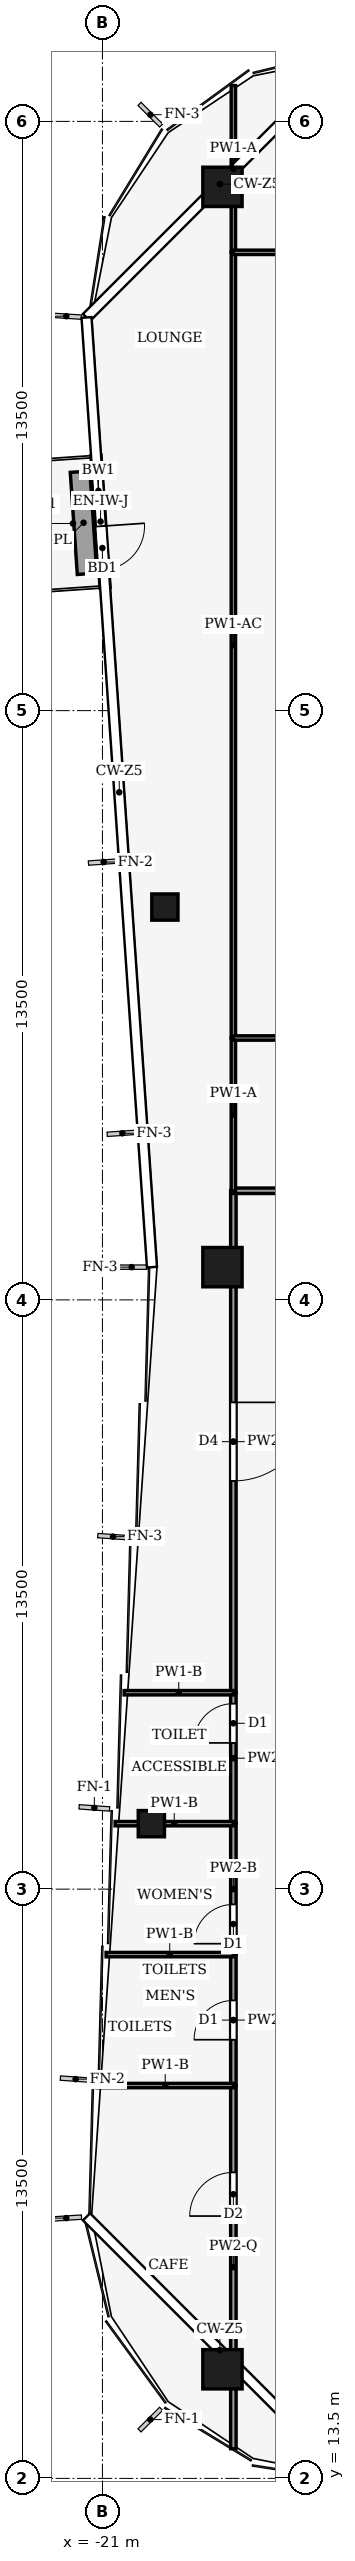
"""IFC4 building model, lengths in metres.
Left out: names, types, materials, properties, quantities, classifications, styles, units other than length and angle.
Written with IfcOpenShell. Run it as: python <this file> out.ifc"""

import sys

from ifc_helpers import new_model, si_unit, direction, frame, frame_2d, origin, origin_2d, place, context, subcontext, project, spatial, rectangle, hollow_rectangle, extrude, element, fill, save


model = new_model("IFC4")
c1 = context("Model", 3, precision=1e-05, world=origin(), true_north=direction((0.0, 1.0)))
c2 = subcontext(c1, "Body", "Model", "MODEL_VIEW")
j1 = project(units=[si_unit("LENGTHUNIT", "METRE"), si_unit("PLANEANGLEUNIT", "RADIAN")], contexts=[c1])
p1 = place(None, origin())
s1 = spatial("IfcSite", under=j1, at=p1, CompositionType="ELEMENT")
p2 = place(p1, origin())
s2 = spatial("IfcBuilding", under=s1, at=p2, CompositionType="ELEMENT")
p3 = place(p2, frame((0.0, 0.0, 289.0)))
s3 = spatial("IfcBuildingStorey", under=s2, at=p3, CompositionType="ELEMENT", Elevation=289.0)
for number, where, z_axis, x_axis in (
    (1, (-18.25, 66.0, 0.0), (0.0, 0.0, 1.0), (1.0, 0.0, 0.0)),
    (2, (-18.25, 16.0, 0.0), (0.0, 0.0, 1.0), (1.0, 0.0, 0.0)),
    (3, (-18.25, 41.25, 0.0), (0.0, 0.0, 1.0), (1.0, 0.0, 0.0)),
):
    element("IfcColumn", number, at=place(p3, frame(where, z_axis=z_axis, x_axis=x_axis)), inside=s3, PredefinedType="COLUMN", context=c2, shape_type="SweptSolid", body=[
        extrude(hollow_rectangle(XDim=0.9, YDim=0.9, WallThickness=0.04, at=origin_2d()), origin(), (0.0, 0.0, 1.0), 5.0),
    ])
for number, where, z_axis, x_axis in (
    (4, (-19.879, 28.5, 0.0), (0.0, 0.0, 1.0), (1.0, 0.0, 0.0)),
    (5, (-19.569, 49.5, 0.0), (0.0, 0.0, 1.0), (1.0, 0.0, 0.0)),
):
    element("IfcColumn", number, at=place(p3, frame(where, z_axis=z_axis, x_axis=x_axis)), inside=s3, PredefinedType="COLUMN", context=c2, shape_type="SweptSolid", body=[
        extrude(hollow_rectangle(XDim=0.6, YDim=0.6, WallThickness=0.025, at=origin_2d()), origin(), (0.0, 0.0, 1.0), 5.0),
    ])
p4 = place(p3, frame((-21.148, 59.85, 0.0), z_axis=(0.0, 0.0, 1.0), x_axis=(0.068802091615, -0.997630328423, 0.0)))
e6 = element("IfcWall", 6, at=p4, inside=s3, PredefinedType="SOLIDWALL", context=c2, shape_type="SweptSolid", body=[
    extrude(rectangle(XDim=3.045, YDim=0.23, at=frame_2d((1.522, 0.0))), origin(), (0.0, 0.0, 1.0), 4.65),
])
p5 = place(p4, frame((1.63, 0.0, 0.0)))
e7 = element("IfcOpeningElement", 7, at=p5, cuts=e6, PredefinedType="OPENING", context=c2, shape_type="SweptSolid", body=[
    extrude(rectangle(XDim=1.0, YDim=2.1, at=frame_2d((0.5, 1.05))), frame((0.0, 0.125, 0.0), z_axis=(0.0, -1.0, 0.0), x_axis=(1.0, 0.0, 0.0)), (0.0, 0.0, 1.0), 0.25),
])
p6 = place(p4, frame((0.415, 0.0, 0.9)))
e8 = element("IfcOpeningElement", 8, at=p6, cuts=e6, PredefinedType="OPENING", context=c2, shape_type="SweptSolid", body=[
    extrude(rectangle(XDim=0.8, YDim=1.2, at=frame_2d((0.4, 0.6))), frame((0.0, 0.125, 0.0), z_axis=(0.0, -1.0, 0.0), x_axis=(1.0, 0.0, 0.0)), (0.0, 0.0, 1.0), 0.25),
])
p7 = place(p3, frame((-21.513, 59.474, 0.0), z_axis=(0.0, 0.0, 1.0), x_axis=(0.068723472833, -0.997635747295, 0.0)))
e9 = element("IfcWall", 9, at=p7, inside=s3, PredefinedType="USERDEFINED", context=c2, shape_type="SweptSolid", body=[
    extrude(rectangle(XDim=2.345, YDim=0.45, at=frame_2d((1.172, 0.0))), origin(), (0.0, 0.0, 1.0), 0.4),
])
p8 = place(p3, frame((-18.0, 14.18, 0.0), z_axis=(0.0, 0.0, 1.0), x_axis=(0.0, 1.0, 0.0)))
e10 = element("IfcWall", 10, at=p8, inside=s3, PredefinedType="PARTITIONING", context=c2, shape_type="SweptSolid", body=[
    extrude(rectangle(XDim=8.32, YDim=0.125, at=frame_2d((4.16, 0.0))), origin(), (0.0, 0.0, 1.0), 3.93),
])
p9 = place(p8, frame((5.33, 0.0, 0.0)))
e11 = element("IfcOpeningElement", 11, at=p9, cuts=e10, PredefinedType="OPENING", context=c2, shape_type="SweptSolid", body=[
    extrude(rectangle(XDim=1.0, YDim=2.1, at=frame_2d((0.5, 1.05))), frame((0.0, 0.073, 0.0), z_axis=(0.0, -1.0, 0.0), x_axis=(1.0, 0.0, 0.0)), (0.0, 0.0, 1.0), 0.145),
])
p10 = place(p3, frame((-18.0, 22.5, 0.0), z_axis=(0.0, 0.0, 1.0), x_axis=(0.0, 1.0, 0.0)))
e12 = element("IfcWall", 12, at=p10, inside=s3, PredefinedType="PARTITIONING", context=c2, shape_type="SweptSolid", body=[
    extrude(rectangle(XDim=3.0, YDim=0.125, at=frame_2d((1.5, 0.0))), origin(), (0.0, 0.0, 1.0), 4.54),
])
p11 = place(p10, frame((1.05, 0.0, 0.0)))
e13 = element("IfcOpeningElement", 13, at=p11, cuts=e12, PredefinedType="OPENING", context=c2, shape_type="SweptSolid", body=[
    extrude(rectangle(XDim=0.9, YDim=2.1, at=frame_2d((0.45, 1.05))), frame((0.0, 0.073, 0.0), z_axis=(0.0, -1.0, 0.0), x_axis=(1.0, 0.0, 0.0)), (0.0, 0.0, 1.0), 0.145),
])
p12 = place(p3, frame((-18.0, 25.5, 0.0), z_axis=(0.0, 0.0, 1.0), x_axis=(0.0, 1.0, 0.0)))
e14 = element("IfcWall", 14, at=p12, inside=s3, PredefinedType="PARTITIONING", context=c2, shape_type="SweptSolid", body=[
    extrude(rectangle(XDim=3.0, YDim=0.125, at=frame_2d((1.5, 0.0))), origin(), (0.0, 0.0, 1.0), 4.87),
])
p13 = place(p12, frame((0.25, 0.0, 0.0)))
e15 = element("IfcOpeningElement", 15, at=p13, cuts=e14, PredefinedType="OPENING", context=c2, shape_type="SweptSolid", body=[
    extrude(rectangle(XDim=0.9, YDim=2.1, at=frame_2d((0.45, 1.05))), frame((0.0, 0.073, 0.0), z_axis=(0.0, -1.0, 0.0), x_axis=(1.0, 0.0, 0.0)), (0.0, 0.0, 1.0), 0.145),
])
p14 = place(p3, frame((-18.0, 28.5, 0.0), z_axis=(0.0, 0.0, 1.0), x_axis=(0.0, 1.0, 0.0)))
e16 = element("IfcWall", 16, at=p14, inside=s3, PredefinedType="PARTITIONING", context=c2, shape_type="SweptSolid", body=[
    extrude(rectangle(XDim=3.0, YDim=0.125, at=frame_2d((1.5, 0.0))), origin(), (0.0, 0.0, 1.0), 4.87),
])
p15 = place(p14, frame((1.85, 0.0, 0.0)))
e17 = element("IfcOpeningElement", 17, at=p15, cuts=e16, PredefinedType="OPENING", context=c2, shape_type="SweptSolid", body=[
    extrude(rectangle(XDim=0.9, YDim=2.1, at=frame_2d((0.45, 1.05))), frame((0.0, 0.073, 0.0), z_axis=(0.0, -1.0, 0.0), x_axis=(1.0, 0.0, 0.0)), (0.0, 0.0, 1.0), 0.145),
])
p16 = place(p3, frame((-18.0, 43.004, 0.0), z_axis=(0.0, 0.0, 1.0), x_axis=(0.0, -1.0, 0.0)))
e18 = element("IfcWall", 18, at=p16, inside=s3, PredefinedType="PARTITIONING", context=c2, shape_type="SweptSolid", body=[
    extrude(rectangle(XDim=11.504, YDim=0.125, at=frame_2d((5.752, 0.0))), origin(), (0.0, 0.0, 1.0), 4.14),
])
p17 = place(p16, frame((4.852, 0.0, 0.0)))
e19 = element("IfcOpeningElement", 19, at=p17, cuts=e18, PredefinedType="OPENING", context=c2, shape_type="SweptSolid", body=[
    extrude(rectangle(XDim=1.8, YDim=2.1, at=frame_2d((0.9, 1.05))), frame((0.0, 0.073, 0.0), z_axis=(0.0, -1.0, 0.0), x_axis=(1.0, 0.0, 0.0)), (0.0, 0.0, 1.0), 0.145),
])
p18 = place(p3, frame((-18.0, 43.0, 0.0), z_axis=(0.0, 0.0, 1.0), x_axis=(1.0, 0.0, 0.0)))
e20 = element("IfcWall", 20, at=p18, inside=s3, PredefinedType="PARTITIONING", context=c2, shape_type="SweptSolid", body=[
    extrude(rectangle(XDim=12.0, YDim=0.125, at=frame_2d((6.0, 0.0))), origin(), (0.0, 0.0, 1.0), 4.39),
])
p19 = place(p18, frame((5.5, 0.0, 0.0)))
e21 = element("IfcOpeningElement", 21, at=p19, cuts=e20, PredefinedType="OPENING", context=c2, shape_type="SweptSolid", body=[
    extrude(rectangle(XDim=1.0, YDim=2.1, at=frame_2d((0.5, 1.05))), frame((0.0, 0.073, 0.0), z_axis=(0.0, -1.0, 0.0), x_axis=(1.0, 0.0, 0.0)), (0.0, 0.0, 1.0), 0.145),
])
p20 = place(p3, frame((-18.0, 22.5, 0.0), z_axis=(0.0, 0.0, 1.0), x_axis=(-1.0, 0.0, 0.0)))
e22 = element("IfcWall", 22, at=p20, inside=s3, PredefinedType="PARTITIONING", context=c2, shape_type="SweptSolid", body=[
    extrude(rectangle(XDim=3.123, YDim=0.1, at=frame_2d((1.562, 0.0))), origin(), (0.0, 0.0, 1.0), 4.04),
])
p21 = place(p3, frame((-18.0, 25.5, 0.0), z_axis=(0.0, 0.0, 1.0), x_axis=(-1.0, 0.0, 0.0)))
e23 = element("IfcWall", 23, at=p21, inside=s3, PredefinedType="PARTITIONING", context=c2, shape_type="SweptSolid", body=[
    extrude(rectangle(XDim=2.916, YDim=0.1, at=frame_2d((1.458, 0.0))), origin(), (0.0, 0.0, 1.0), 4.04),
])
p22 = place(p3, frame((-18.0, 28.5, 0.0), z_axis=(0.0, 0.0, 1.0), x_axis=(-1.0, 0.0, 0.0)))
e24 = element("IfcWall", 24, at=p22, inside=s3, PredefinedType="PARTITIONING", context=c2, shape_type="SweptSolid", body=[
    extrude(rectangle(XDim=2.709, YDim=0.1, at=frame_2d((1.354, 0.0))), origin(), (0.0, 0.0, 1.0), 4.04),
])
p23 = place(p3, frame((-18.0, 31.5, 0.0), z_axis=(0.0, 0.0, 1.0), x_axis=(-1.0, 0.0, 0.0)))
e25 = element("IfcWall", 25, at=p23, inside=s3, PredefinedType="PARTITIONING", context=c2, shape_type="SweptSolid", body=[
    extrude(rectangle(XDim=2.502, YDim=0.1, at=frame_2d((1.251, 0.0))), origin(), (0.0, 0.0, 1.0), 4.04),
])
p24 = place(p3, frame((-18.0, 43.0, 0.0), z_axis=(0.0, 0.0, 1.0), x_axis=(0.0, 1.0, 0.0)))
e26 = element("IfcWall", 26, at=p24, inside=s3, PredefinedType="PARTITIONING", context=c2, shape_type="SweptSolid", body=[
    extrude(rectangle(XDim=3.5, YDim=0.1, at=frame_2d((1.75, 0.0))), origin(), (0.0, 0.0, 1.0), 4.87),
])
p25 = place(p3, frame((-18.0, 46.5, 0.0), z_axis=(0.0, 0.0, 1.0), x_axis=(0.0, 1.0, 0.0)))
e27 = element("IfcWall", 27, at=p25, inside=s3, PredefinedType="PARTITIONING", context=c2, shape_type="SweptSolid", body=[
    extrude(rectangle(XDim=18.0, YDim=0.1, at=frame_2d((9.0, 0.0))), origin(), (0.0, 0.0, 1.0), 4.35),
])
p26 = place(p3, frame((-18.0, 64.5, 0.0), z_axis=(0.0, 0.0, 1.0), x_axis=(0.0, 1.0, 0.0)))
e28 = element("IfcWall", 28, at=p26, inside=s3, PredefinedType="PARTITIONING", context=c2, shape_type="SweptSolid", body=[
    extrude(rectangle(XDim=3.82, YDim=0.1, at=frame_2d((1.91, 0.0))), origin(), (0.0, 0.0, 1.0), 4.87),
])
p27 = place(p3, frame((-5.996, 46.5, 0.0), z_axis=(0.0, 0.0, 1.0), x_axis=(-1.0, 0.0, 0.0)))
e29 = element("IfcWall", 29, at=p27, inside=s3, PredefinedType="PARTITIONING", context=c2, shape_type="SweptSolid", body=[
    extrude(rectangle(XDim=12.004, YDim=0.1, at=frame_2d((6.002, 0.0))), origin(), (0.0, 0.0, 1.0), 4.39),
])
p28 = place(p3, frame((-18.0, 64.5, 0.0), z_axis=(0.0, 0.0, 1.0), x_axis=(1.0, 0.0, 0.0)))
e30 = element("IfcWall", 30, at=p28, inside=s3, PredefinedType="PARTITIONING", context=c2, shape_type="SweptSolid", body=[
    extrude(rectangle(XDim=9.0, YDim=0.1, at=frame_2d((4.5, 0.0))), origin(), (0.0, 0.0, 1.0), 4.24),
])
p29 = place(p28, frame((3.2, 0.0, 0.0)))
e31 = element("IfcOpeningElement", 31, at=p29, cuts=e30, PredefinedType="OPENING", context=c2, shape_type="SweptSolid", body=[
    extrude(rectangle(XDim=1.0, YDim=2.1, at=frame_2d((0.5, 1.05))), frame((0.0, 0.06, 0.0), z_axis=(0.0, -1.0, 0.0), x_axis=(1.0, 0.0, 0.0)), (0.0, 0.0, 1.0), 0.12),
])
p30 = place(p5, origin())
e32 = element("IfcDoor", 32, at=p30, inside=s3, OperationType="SINGLE_SWING_RIGHT", PredefinedType="DOOR", context=c2, shape_type="SweptSolid", body=[
    extrude(rectangle(XDim=1.0, YDim=2.1, at=frame_2d((0.5, 1.05))), frame((0.0, 0.025, 0.0), z_axis=(0.0, -1.0, 0.0), x_axis=(1.0, 0.0, 0.0)), (0.0, 0.0, 1.0), 0.05),
])
fill(e7, e32)
p31 = place(p6, origin())
e33 = element("IfcWindow", 33, at=p31, inside=s3, PartitioningType="SINGLE_PANEL", PredefinedType="WINDOW", context=c2, shape_type="SweptSolid", body=[
    extrude(rectangle(XDim=0.8, YDim=1.2, at=frame_2d((0.4, 0.6))), frame((0.0, 0.03, 0.0), z_axis=(0.0, -1.0, 0.0), x_axis=(1.0, 0.0, 0.0)), (0.0, 0.0, 1.0), 0.06),
])
fill(e8, e33)
p32 = place(p9, origin())
e34 = element("IfcDoor", 34, at=p32, inside=s3, OperationType="SINGLE_SWING_RIGHT", PredefinedType="DOOR", context=c2, shape_type="SweptSolid", body=[
    extrude(rectangle(XDim=1.0, YDim=2.1, at=frame_2d((0.5, 1.05))), frame((0.0, 0.025, 0.0), z_axis=(0.0, -1.0, 0.0), x_axis=(1.0, 0.0, 0.0)), (0.0, 0.0, 1.0), 0.05),
])
fill(e11, e34)
p33 = place(p11, origin())
e35 = element("IfcDoor", 35, at=p33, inside=s3, OperationType="SINGLE_SWING_RIGHT", PredefinedType="DOOR", context=c2, shape_type="SweptSolid", body=[
    extrude(rectangle(XDim=0.9, YDim=2.1, at=frame_2d((0.45, 1.05))), frame((0.0, 0.025, 0.0), z_axis=(0.0, -1.0, 0.0), x_axis=(1.0, 0.0, 0.0)), (0.0, 0.0, 1.0), 0.05),
])
fill(e13, e35)
p34 = place(p13, origin())
e36 = element("IfcDoor", 36, at=p34, inside=s3, OperationType="SINGLE_SWING_LEFT", PredefinedType="DOOR", context=c2, shape_type="SweptSolid", body=[
    extrude(rectangle(XDim=0.9, YDim=2.1, at=frame_2d((0.45, 1.05))), frame((0.0, 0.025, 0.0), z_axis=(0.0, -1.0, 0.0), x_axis=(1.0, 0.0, 0.0)), (0.0, 0.0, 1.0), 0.05),
])
fill(e15, e36)
p35 = place(p15, origin())
e37 = element("IfcDoor", 37, at=p35, inside=s3, OperationType="SINGLE_SWING_RIGHT", PredefinedType="DOOR", context=c2, shape_type="SweptSolid", body=[
    extrude(rectangle(XDim=0.9, YDim=2.1, at=frame_2d((0.45, 1.05))), frame((0.0, 0.025, 0.0), z_axis=(0.0, -1.0, 0.0), x_axis=(1.0, 0.0, 0.0)), (0.0, 0.0, 1.0), 0.05),
])
fill(e17, e37)
p36 = place(p17, origin())
e38 = element("IfcDoor", 38, at=p36, inside=s3, OperationType="DOUBLE_DOOR_SINGLE_SWING", PredefinedType="DOOR", context=c2, shape_type="SweptSolid", body=[
    extrude(rectangle(XDim=1.8, YDim=2.1, at=frame_2d((0.9, 1.05))), frame((0.0, 0.025, 0.0), z_axis=(0.0, -1.0, 0.0), x_axis=(1.0, 0.0, 0.0)), (0.0, 0.0, 1.0), 0.05),
])
fill(e19, e38)
save(model, sys.argv[1])
